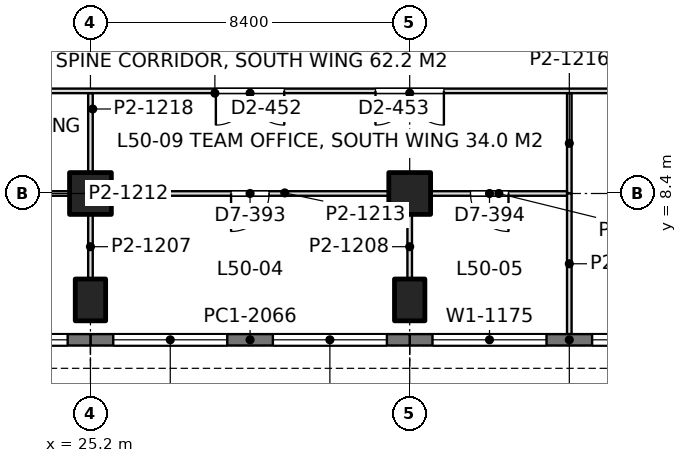
"""IFC4 building model, lengths in metres.
Left out: names, types, materials, properties, quantities, classifications, styles, units other than length and angle.
Written with IfcOpenShell. Run it as: python <this file> out.ifc"""

import sys

from ifc_helpers import new_model, si_unit, direction, frame, frame_2d, origin, origin_2d, place, context, subcontext, project, spatial, rectangle, extrude, element, fill, save


model = new_model("IFC4")
c1 = context("Model", 3, precision=1e-05, world=origin(), true_north=direction((0.0, 1.0)))
c2 = subcontext(c1, "Body", "Model", "MODEL_VIEW")
j1 = project(units=[si_unit("LENGTHUNIT", "METRE"), si_unit("PLANEANGLEUNIT", "RADIAN")], contexts=[c1])
p1 = place(None, origin())
s1 = spatial("IfcSite", under=j1, at=p1, CompositionType="ELEMENT")
p2 = place(p1, origin())
s2 = spatial("IfcBuilding", under=s1, at=p2, CompositionType="ELEMENT")
p3 = place(p2, frame((0.0, 0.0, 219.6)))
s3 = spatial("IfcBuildingStorey", under=s2, at=p3, CompositionType="ELEMENT", Elevation=219.6)
p4 = place(p3, frame((25.2, 5.6, 0.0), z_axis=(0.0, 0.0, 1.0), x_axis=(1.0, 0.0, 0.0)))
e1 = element("IfcColumn", 1, at=p4, inside=s3, PredefinedType="COLUMN", context=c2, shape_type="SweptSolid", body=[
    extrude(rectangle(XDim=0.8, YDim=1.1, at=origin_2d()), origin(), (0.0, 0.0, 1.0), 4.2),
])
p5 = place(p3, frame((25.2, 8.4, 0.0), z_axis=(0.0, 0.0, 1.0), x_axis=(1.0, 0.0, 0.0)))
e2 = element("IfcColumn", 2, at=p5, inside=s3, PredefinedType="COLUMN", context=c2, shape_type="SweptSolid", body=[
    extrude(rectangle(XDim=1.1, YDim=1.1, at=origin_2d()), origin(), (0.0, 0.0, 1.0), 4.2),
])
p6 = place(p3, frame((33.6, 5.6, 0.0), z_axis=(0.0, 0.0, 1.0), x_axis=(1.0, 0.0, 0.0)))
e3 = element("IfcColumn", 3, at=p6, inside=s3, PredefinedType="COLUMN", context=c2, shape_type="SweptSolid", body=[
    extrude(rectangle(XDim=0.8, YDim=1.1, at=origin_2d()), origin(), (0.0, 0.0, 1.0), 4.2),
])
p7 = place(p3, frame((33.6, 8.4, 0.0), z_axis=(0.0, 0.0, 1.0), x_axis=(1.0, 0.0, 0.0)))
e4 = element("IfcColumn", 4, at=p7, inside=s3, PredefinedType="COLUMN", context=c2, shape_type="SweptSolid", body=[
    extrude(rectangle(XDim=1.1, YDim=1.1, at=origin_2d()), origin(), (0.0, 0.0, 1.0), 4.2),
])
p8 = place(p3, frame((42.0, 4.55, 0.0), z_axis=(0.0, 0.0, 1.0), x_axis=(-1.0, 0.0, 0.0)))
e5 = element("IfcWall", 5, at=p8, inside=s3, PredefinedType="SOLIDWALL", context=c2, shape_type="SweptSolid", body=[
    extrude(rectangle(XDim=8.4, YDim=0.3, at=frame_2d((4.2, 0.0))), origin(), (0.0, 0.0, 1.0), 4.05),
])
p9 = place(p8, frame((0.6, 0.0, 0.9)))
e6 = element("IfcOpeningElement", 6, at=p9, cuts=e5, PredefinedType="OPENING", context=c2, shape_type="SweptSolid", body=[
    extrude(rectangle(XDim=3.0, YDim=1.9, at=frame_2d((1.5, 0.95))), frame((0.0, 0.16, 0.0), z_axis=(0.0, -1.0, 0.0), x_axis=(1.0, 0.0, 0.0)), (0.0, 0.0, 1.0), 0.32),
])
p10 = place(p8, frame((4.8, 0.0, 0.9)))
e7 = element("IfcOpeningElement", 7, at=p10, cuts=e5, PredefinedType="OPENING", context=c2, shape_type="SweptSolid", body=[
    extrude(rectangle(XDim=3.0, YDim=1.9, at=frame_2d((1.5, 0.95))), frame((0.0, 0.16, 0.0), z_axis=(0.0, -1.0, 0.0), x_axis=(1.0, 0.0, 0.0)), (0.0, 0.0, 1.0), 0.32),
])
p11 = place(p3, frame((33.6, 4.55, 0.0), z_axis=(0.0, 0.0, 1.0), x_axis=(-1.0, 0.0, 0.0)))
e8 = element("IfcWall", 8, at=p11, inside=s3, PredefinedType="SOLIDWALL", context=c2, shape_type="SweptSolid", body=[
    extrude(rectangle(XDim=8.4, YDim=0.3, at=frame_2d((4.2, 0.0))), origin(), (0.0, 0.0, 1.0), 4.05),
])
p12 = place(p11, frame((0.6, 0.0, 0.9)))
e9 = element("IfcOpeningElement", 9, at=p12, cuts=e8, PredefinedType="OPENING", context=c2, shape_type="SweptSolid", body=[
    extrude(rectangle(XDim=3.0, YDim=1.9, at=frame_2d((1.5, 0.95))), frame((0.0, 0.16, 0.0), z_axis=(0.0, -1.0, 0.0), x_axis=(1.0, 0.0, 0.0)), (0.0, 0.0, 1.0), 0.32),
])
p13 = place(p11, frame((4.8, 0.0, 0.9)))
e10 = element("IfcOpeningElement", 10, at=p13, cuts=e8, PredefinedType="OPENING", context=c2, shape_type="SweptSolid", body=[
    extrude(rectangle(XDim=3.0, YDim=1.9, at=frame_2d((1.5, 0.95))), frame((0.0, 0.16, 0.0), z_axis=(0.0, -1.0, 0.0), x_axis=(1.0, 0.0, 0.0)), (0.0, 0.0, 1.0), 0.32),
])
p14 = place(p3, frame((25.2, 4.55, 0.0), z_axis=(0.0, 0.0, 1.0), x_axis=(-1.0, 0.0, 0.0)))
e11 = element("IfcWall", 11, at=p14, inside=s3, PredefinedType="SOLIDWALL", context=c2, shape_type="SweptSolid", body=[
    extrude(rectangle(XDim=8.4, YDim=0.3, at=frame_2d((4.2, 0.0))), origin(), (0.0, 0.0, 1.0), 4.05),
])
p15 = place(p14, frame((0.6, 0.0, 0.9)))
e12 = element("IfcOpeningElement", 12, at=p15, cuts=e11, PredefinedType="OPENING", context=c2, shape_type="SweptSolid", body=[
    extrude(rectangle(XDim=3.0, YDim=1.9, at=frame_2d((1.5, 0.95))), frame((0.0, 0.16, 0.0), z_axis=(0.0, -1.0, 0.0), x_axis=(1.0, 0.0, 0.0)), (0.0, 0.0, 1.0), 0.32),
])
p16 = place(p14, frame((4.8, 0.0, 0.9)))
e13 = element("IfcOpeningElement", 13, at=p16, cuts=e11, PredefinedType="OPENING", context=c2, shape_type="SweptSolid", body=[
    extrude(rectangle(XDim=3.0, YDim=1.9, at=frame_2d((1.5, 0.95))), frame((0.0, 0.16, 0.0), z_axis=(0.0, -1.0, 0.0), x_axis=(1.0, 0.0, 0.0)), (0.0, 0.0, 1.0), 0.32),
])
p17 = place(p3, frame((17.349, 8.4, 0.0), z_axis=(0.0, 0.0, 1.0), x_axis=(1.0, 0.0, 0.0)))
e14 = element("IfcWall", 14, at=p17, inside=s3, PredefinedType="PARTITIONING", context=c2, shape_type="SweptSolid", body=[
    extrude(rectangle(XDim=7.302, YDim=0.12, at=frame_2d((3.651, 0.0))), origin(), (0.0, 0.0, 1.0), 3.55),
])
p18 = place(p17, frame((3.151, 0.0, 0.0)))
e15 = element("IfcOpeningElement", 15, at=p18, cuts=e14, PredefinedType="OPENING", context=c2, shape_type="SweptSolid", body=[
    extrude(rectangle(XDim=1.0, YDim=2.4, at=frame_2d((0.5, 1.2))), frame((0.0, 0.07, 0.0), z_axis=(0.0, -1.0, 0.0), x_axis=(1.0, 0.0, 0.0)), (0.0, 0.0, 1.0), 0.14),
])
p19 = place(p3, frame((25.749, 8.4, 0.0), z_axis=(0.0, 0.0, 1.0), x_axis=(1.0, 0.0, 0.0)))
e16 = element("IfcWall", 16, at=p19, inside=s3, PredefinedType="PARTITIONING", context=c2, shape_type="SweptSolid", body=[
    extrude(rectangle(XDim=7.302, YDim=0.12, at=frame_2d((3.651, 0.0))), origin(), (0.0, 0.0, 1.0), 3.55),
])
p20 = place(p19, frame((3.151, 0.0, 0.0)))
e17 = element("IfcOpeningElement", 17, at=p20, cuts=e16, PredefinedType="OPENING", context=c2, shape_type="SweptSolid", body=[
    extrude(rectangle(XDim=1.0, YDim=2.4, at=frame_2d((0.5, 1.2))), frame((0.0, 0.07, 0.0), z_axis=(0.0, -1.0, 0.0), x_axis=(1.0, 0.0, 0.0)), (0.0, 0.0, 1.0), 0.14),
])
p21 = place(p3, frame((34.149, 8.4, 0.0), z_axis=(0.0, 0.0, 1.0), x_axis=(1.0, 0.0, 0.0)))
e18 = element("IfcWall", 18, at=p21, inside=s3, PredefinedType="PARTITIONING", context=c2, shape_type="SweptSolid", body=[
    extrude(rectangle(XDim=3.593, YDim=0.12, at=frame_2d((1.796, 0.0))), origin(), (0.0, 0.0, 1.0), 3.55),
])
p22 = place(p21, frame((1.051, 0.0, 0.0)))
e19 = element("IfcOpeningElement", 19, at=p22, cuts=e18, PredefinedType="OPENING", context=c2, shape_type="SweptSolid", body=[
    extrude(rectangle(XDim=1.0, YDim=2.4, at=frame_2d((0.5, 1.2))), frame((0.0, 0.07, 0.0), z_axis=(0.0, -1.0, 0.0), x_axis=(1.0, 0.0, 0.0)), (0.0, 0.0, 1.0), 0.14),
])
for number, where, z_axis, x_axis in (
    (20, (25.2, 6.149, 0.0), (0.0, 0.0, 1.0), (0.0, 1.0, 0.0)),
    (21, (33.6, 6.149, 0.0), (0.0, 0.0, 1.0), (0.0, 1.0, 0.0)),
):
    element("IfcWall", number, at=place(p3, frame(where, z_axis=z_axis, x_axis=x_axis)), inside=s3, PredefinedType="PARTITIONING", context=c2, shape_type="SweptSolid", body=[
        extrude(rectangle(XDim=1.702, YDim=0.12, at=frame_2d((0.851, 0.0))), origin(), (0.0, 0.0, 1.0), 3.69),
    ])
p23 = place(p3, frame((37.8, 4.7, 0.0), z_axis=(0.0, 0.0, 1.0), x_axis=(0.0, 1.0, 0.0)))
e22 = element("IfcWall", 22, at=p23, inside=s3, PredefinedType="PARTITIONING", context=c2, shape_type="SweptSolid", body=[
    extrude(rectangle(XDim=3.702, YDim=0.12, at=frame_2d((1.851, 0.0))), origin(), (0.0, 0.0, 1.0), 3.55),
])
p24 = place(p3, frame((25.2, 8.949, 0.0), z_axis=(0.0, 0.0, 1.0), x_axis=(0.0, 1.0, 0.0)))
e23 = element("IfcWall", 23, at=p24, inside=s3, PredefinedType="PARTITIONING", context=c2, shape_type="SweptSolid", body=[
    extrude(rectangle(XDim=2.093, YDim=0.12, at=frame_2d((1.046, 0.0))), origin(), (0.0, 0.0, 1.0), 3.55),
])
p25 = place(p3, frame((37.8, 8.398, 0.0), z_axis=(0.0, 0.0, 1.0), x_axis=(0.0, 1.0, 0.0)))
e24 = element("IfcWall", 24, at=p25, inside=s3, PredefinedType="PARTITIONING", context=c2, shape_type="SweptSolid", body=[
    extrude(rectangle(XDim=2.644, YDim=0.12, at=frame_2d((1.322, 0.0))), origin(), (0.0, 0.0, 1.0), 3.55),
])
p26 = place(p3, frame((7.748, 11.1, 0.0), z_axis=(0.0, 0.0, 1.0), x_axis=(1.0, 0.0, 0.0)))
e25 = element("IfcWall", 25, at=p26, inside=s3, PredefinedType="PARTITIONING", context=c2, shape_type="SweptSolid", body=[
    extrude(rectangle(XDim=41.452, YDim=0.12, at=frame_2d((20.726, 0.0))), origin(), (0.0, 0.0, 1.0), 3.55),
])
p27 = place(p26, frame((2.119, 0.0, 0.0)))
e26 = element("IfcOpeningElement", 26, at=p27, cuts=e25, PredefinedType="OPENING", context=c2, shape_type="SweptSolid", body=[
    extrude(rectangle(XDim=1.8, YDim=2.2, at=frame_2d((0.9, 1.1))), frame((0.0, 0.07, 0.0), z_axis=(0.0, -1.0, 0.0), x_axis=(1.0, 0.0, 0.0)), (0.0, 0.0, 1.0), 0.14),
])
p28 = place(p26, frame((5.135, 0.0, 0.0)))
e27 = element("IfcOpeningElement", 27, at=p28, cuts=e25, PredefinedType="OPENING", context=c2, shape_type="SweptSolid", body=[
    extrude(rectangle(XDim=1.8, YDim=2.2, at=frame_2d((0.9, 1.1))), frame((0.0, 0.07, 0.0), z_axis=(0.0, -1.0, 0.0), x_axis=(1.0, 0.0, 0.0)), (0.0, 0.0, 1.0), 0.14),
])
p29 = place(p26, frame((12.352, 0.0, 0.0)))
e28 = element("IfcOpeningElement", 28, at=p29, cuts=e25, PredefinedType="OPENING", context=c2, shape_type="SweptSolid", body=[
    extrude(rectangle(XDim=1.8, YDim=2.2, at=frame_2d((0.9, 1.1))), frame((0.0, 0.07, 0.0), z_axis=(0.0, -1.0, 0.0), x_axis=(1.0, 0.0, 0.0)), (0.0, 0.0, 1.0), 0.14),
])
p30 = place(p26, frame((20.752, 0.0, 0.0)))
e29 = element("IfcOpeningElement", 29, at=p30, cuts=e25, PredefinedType="OPENING", context=c2, shape_type="SweptSolid", body=[
    extrude(rectangle(XDim=1.8, YDim=2.2, at=frame_2d((0.9, 1.1))), frame((0.0, 0.07, 0.0), z_axis=(0.0, -1.0, 0.0), x_axis=(1.0, 0.0, 0.0)), (0.0, 0.0, 1.0), 0.14),
])
p31 = place(p26, frame((24.952, 0.0, 0.0)))
e30 = element("IfcOpeningElement", 30, at=p31, cuts=e25, PredefinedType="OPENING", context=c2, shape_type="SweptSolid", body=[
    extrude(rectangle(XDim=1.8, YDim=2.2, at=frame_2d((0.9, 1.1))), frame((0.0, 0.07, 0.0), z_axis=(0.0, -1.0, 0.0), x_axis=(1.0, 0.0, 0.0)), (0.0, 0.0, 1.0), 0.14),
])
p32 = place(p26, frame((32.952, 0.0, 0.0)))
e31 = element("IfcOpeningElement", 31, at=p32, cuts=e25, PredefinedType="OPENING", context=c2, shape_type="SweptSolid", body=[
    extrude(rectangle(XDim=1.8, YDim=2.2, at=frame_2d((0.9, 1.1))), frame((0.0, 0.07, 0.0), z_axis=(0.0, -1.0, 0.0), x_axis=(1.0, 0.0, 0.0)), (0.0, 0.0, 1.0), 0.14),
])
p33 = place(p26, frame((36.752, 0.0, 0.0)))
e32 = element("IfcOpeningElement", 32, at=p33, cuts=e25, PredefinedType="OPENING", context=c2, shape_type="SweptSolid", body=[
    extrude(rectangle(XDim=1.8, YDim=2.2, at=frame_2d((0.9, 1.1))), frame((0.0, 0.07, 0.0), z_axis=(0.0, -1.0, 0.0), x_axis=(1.0, 0.0, 0.0)), (0.0, 0.0, 1.0), 0.14),
])
p34 = place(p9, origin())
e33 = element("IfcWindow", 33, at=p34, inside=s3, PartitioningType="SINGLE_PANEL", PredefinedType="WINDOW", context=c2, shape_type="SweptSolid", body=[
    extrude(rectangle(XDim=3.0, YDim=1.9, at=frame_2d((1.5, 0.95))), frame((0.0, 0.03, 0.0), z_axis=(0.0, -1.0, 0.0), x_axis=(1.0, 0.0, 0.0)), (0.0, 0.0, 1.0), 0.06),
])
fill(e6, e33)
p35 = place(p10, origin())
e34 = element("IfcWindow", 34, at=p35, inside=s3, PartitioningType="SINGLE_PANEL", PredefinedType="WINDOW", context=c2, shape_type="SweptSolid", body=[
    extrude(rectangle(XDim=3.0, YDim=1.9, at=frame_2d((1.5, 0.95))), frame((0.0, 0.03, 0.0), z_axis=(0.0, -1.0, 0.0), x_axis=(1.0, 0.0, 0.0)), (0.0, 0.0, 1.0), 0.06),
])
fill(e7, e34)
p36 = place(p12, origin())
e35 = element("IfcWindow", 35, at=p36, inside=s3, PartitioningType="SINGLE_PANEL", PredefinedType="WINDOW", context=c2, shape_type="SweptSolid", body=[
    extrude(rectangle(XDim=3.0, YDim=1.9, at=frame_2d((1.5, 0.95))), frame((0.0, 0.03, 0.0), z_axis=(0.0, -1.0, 0.0), x_axis=(1.0, 0.0, 0.0)), (0.0, 0.0, 1.0), 0.06),
])
fill(e9, e35)
p37 = place(p13, origin())
e36 = element("IfcWindow", 36, at=p37, inside=s3, PartitioningType="SINGLE_PANEL", PredefinedType="WINDOW", context=c2, shape_type="SweptSolid", body=[
    extrude(rectangle(XDim=3.0, YDim=1.9, at=frame_2d((1.5, 0.95))), frame((0.0, 0.03, 0.0), z_axis=(0.0, -1.0, 0.0), x_axis=(1.0, 0.0, 0.0)), (0.0, 0.0, 1.0), 0.06),
])
fill(e10, e36)
p38 = place(p15, origin())
e37 = element("IfcWindow", 37, at=p38, inside=s3, PartitioningType="SINGLE_PANEL", PredefinedType="WINDOW", context=c2, shape_type="SweptSolid", body=[
    extrude(rectangle(XDim=3.0, YDim=1.9, at=frame_2d((1.5, 0.95))), frame((0.0, 0.03, 0.0), z_axis=(0.0, -1.0, 0.0), x_axis=(1.0, 0.0, 0.0)), (0.0, 0.0, 1.0), 0.06),
])
fill(e12, e37)
p39 = place(p20, frame((1.0, 0.0, 0.0), z_axis=(0.0, 0.0, 1.0), x_axis=(-1.0, 0.0, 0.0)))
e38 = element("IfcDoor", 38, at=p39, inside=s3, OperationType="SINGLE_SWING_RIGHT", PredefinedType="DOOR", context=c2, shape_type="SweptSolid", body=[
    extrude(rectangle(XDim=1.0, YDim=2.4, at=frame_2d((0.5, 1.2))), frame((0.0, 0.025, 0.0), z_axis=(0.0, -1.0, 0.0), x_axis=(1.0, 0.0, 0.0)), (0.0, 0.0, 1.0), 0.05),
])
fill(e17, e38)
p40 = place(p22, frame((1.0, 0.0, 0.0), z_axis=(0.0, 0.0, 1.0), x_axis=(-1.0, 0.0, 0.0)))
e39 = element("IfcDoor", 39, at=p40, inside=s3, OperationType="SINGLE_SWING_LEFT", PredefinedType="DOOR", context=c2, shape_type="SweptSolid", body=[
    extrude(rectangle(XDim=1.0, YDim=2.4, at=frame_2d((0.5, 1.2))), frame((0.0, 0.025, 0.0), z_axis=(0.0, -1.0, 0.0), x_axis=(1.0, 0.0, 0.0)), (0.0, 0.0, 1.0), 0.05),
])
fill(e19, e39)
p41 = place(p30, frame((1.8, 0.0, 0.0), z_axis=(0.0, 0.0, 1.0), x_axis=(-1.0, 0.0, 0.0)))
e40 = element("IfcDoor", 40, at=p41, inside=s3, OperationType="DOUBLE_DOOR_SINGLE_SWING", PredefinedType="DOOR", context=c2, shape_type="SweptSolid", body=[
    extrude(rectangle(XDim=1.8, YDim=2.2, at=frame_2d((0.9, 1.1))), frame((0.0, 0.025, 0.0), z_axis=(0.0, -1.0, 0.0), x_axis=(1.0, 0.0, 0.0)), (0.0, 0.0, 1.0), 0.05),
])
fill(e29, e40)
p42 = place(p31, frame((1.8, 0.0, 0.0), z_axis=(0.0, 0.0, 1.0), x_axis=(-1.0, 0.0, 0.0)))
e41 = element("IfcDoor", 41, at=p42, inside=s3, OperationType="DOUBLE_DOOR_SINGLE_SWING", PredefinedType="DOOR", context=c2, shape_type="SweptSolid", body=[
    extrude(rectangle(XDim=1.8, YDim=2.2, at=frame_2d((0.9, 1.1))), frame((0.0, 0.025, 0.0), z_axis=(0.0, -1.0, 0.0), x_axis=(1.0, 0.0, 0.0)), (0.0, 0.0, 1.0), 0.05),
])
fill(e30, e41)
save(model, sys.argv[1])
